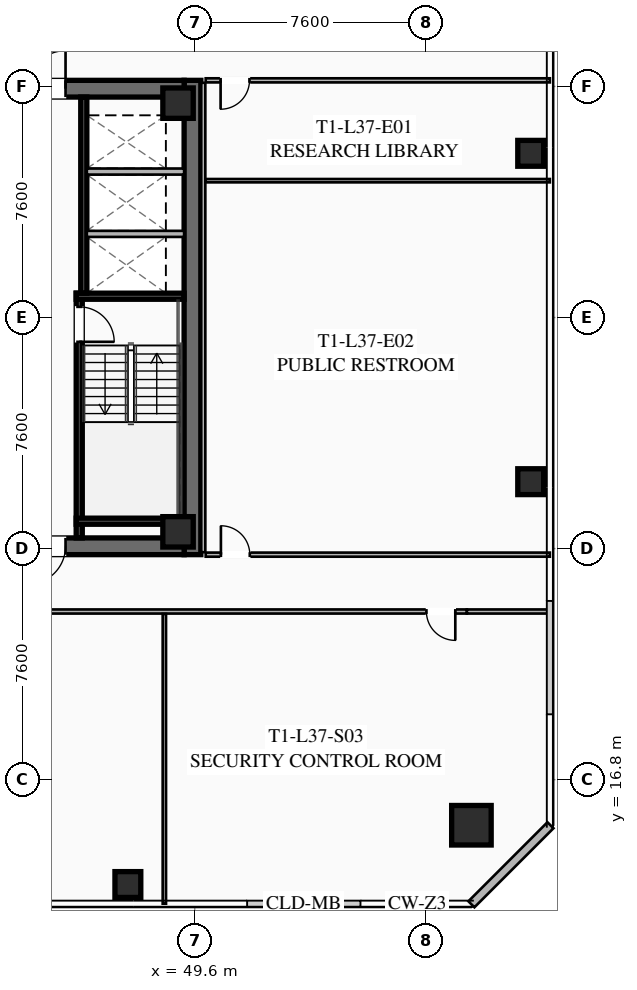
"""IFC4 building model, lengths in metres.
Left out: names, types, materials, properties, quantities, classifications, styles, units other than length and angle.
Written with IfcOpenShell. Run it as: python <this file> out.ifc"""

import sys

from ifc_helpers import new_model, si_unit, direction, frame, frame_2d, origin, origin_2d, place, context, subcontext, project, spatial, rectangle, hollow_rectangle, extrude, element, fill, save


model = new_model("IFC4")
c1 = context("Model", 3, precision=1e-05, world=origin(), true_north=direction((0.0, 1.0)))
c2 = subcontext(c1, "Body", "Model", "MODEL_VIEW")
j1 = project(units=[si_unit("LENGTHUNIT", "METRE"), si_unit("PLANEANGLEUNIT", "RADIAN")], contexts=[c1])
p1 = place(None, origin())
s1 = spatial("IfcSite", under=j1, at=p1, CompositionType="ELEMENT")
p2 = place(p1, origin())
s2 = spatial("IfcBuilding", under=s1, at=p2, CompositionType="ELEMENT")
p3 = place(p2, frame((0.0, 0.0, 139.25)))
s3 = spatial("IfcBuildingStorey", under=s2, at=p3, CompositionType="ELEMENT", Elevation=139.25)
p4 = place(p3, frame((49.525, 39.8, 0.0), z_axis=(0.0, 0.0, 1.0), x_axis=(0.0, -1.0, 0.0)))
e1 = element("IfcWall", 1, at=p4, inside=s3, PredefinedType="SHEAR", context=c2, shape_type="SweptSolid", body=[
    extrude(rectangle(XDim=15.6, YDim=0.55, at=frame_2d((7.8, 0.0))), origin(), (0.0, 0.0, 1.0), 3.55),
])
p5 = place(p3, frame((49.25, 24.475, 0.0), z_axis=(0.0, 0.0, 1.0), x_axis=(-1.0, 0.0, 0.0)))
e2 = element("IfcWall", 2, at=p5, inside=s3, PredefinedType="SHEAR", context=c2, shape_type="SweptSolid", body=[
    extrude(rectangle(XDim=14.5, YDim=0.55, at=frame_2d((7.25, 0.0))), origin(), (0.0, 0.0, 1.0), 3.55),
])
p6 = place(p5, frame((8.95, 0.0, 0.0)))
e3 = element("IfcOpeningElement", 3, at=p6, cuts=e2, PredefinedType="OPENING", context=c2, shape_type="SweptSolid", body=[
    extrude(rectangle(XDim=1.25, YDim=2.25, at=frame_2d((0.625, 1.125))), frame((0.0, 0.285, 0.0), z_axis=(0.0, -1.0, 0.0), x_axis=(1.0, 0.0, 0.0)), (0.0, 0.0, 1.0), 0.57),
])
p7 = place(p5, frame((3.9, 0.0, 0.0)))
e4 = element("IfcOpeningElement", 4, at=p7, cuts=e2, PredefinedType="OPENING", context=c2, shape_type="SweptSolid", body=[
    extrude(rectangle(XDim=1.25, YDim=2.25, at=frame_2d((0.625, 1.125))), frame((0.0, 0.285, 0.0), z_axis=(0.0, -1.0, 0.0), x_axis=(1.0, 0.0, 0.0)), (0.0, 0.0, 1.0), 0.57),
])
p8 = place(p3, frame((34.75, 39.525, 0.0), z_axis=(0.0, 0.0, 1.0), x_axis=(1.0, 0.0, 0.0)))
e5 = element("IfcWall", 5, at=p8, inside=s3, PredefinedType="SHEAR", context=c2, shape_type="SweptSolid", body=[
    extrude(rectangle(XDim=14.5, YDim=0.55, at=frame_2d((7.25, 0.0))), origin(), (0.0, 0.0, 1.0), 3.55),
])
p9 = place(p8, frame((4.3, 0.0, 0.0)))
e6 = element("IfcOpeningElement", 6, at=p9, cuts=e5, PredefinedType="OPENING", context=c2, shape_type="SweptSolid", body=[
    extrude(rectangle(XDim=1.25, YDim=2.25, at=frame_2d((0.625, 1.125))), frame((0.0, 0.285, 0.0), z_axis=(0.0, -1.0, 0.0), x_axis=(1.0, 0.0, 0.0)), (0.0, 0.0, 1.0), 0.57),
])
p10 = place(p8, frame((9.35, 0.0, 0.0)))
e7 = element("IfcOpeningElement", 7, at=p10, cuts=e5, PredefinedType="OPENING", context=c2, shape_type="SweptSolid", body=[
    extrude(rectangle(XDim=1.25, YDim=2.25, at=frame_2d((0.625, 1.125))), frame((0.0, 0.285, 0.0), z_axis=(0.0, -1.0, 0.0), x_axis=(1.0, 0.0, 0.0)), (0.0, 0.0, 1.0), 0.57),
])
for number, where, z_axis, x_axis in (
    (8, (49.05, 24.95, 0.0), (0.0, 0.0, 1.0), (1.0, 0.0, 0.0)),
    (9, (49.05, 39.05, 0.0), (0.0, 0.0, 1.0), (1.0, 0.0, 0.0)),
):
    element("IfcColumn", number, at=place(p3, frame(where, z_axis=z_axis, x_axis=x_axis)), inside=s3, PredefinedType="COLUMN", context=c2, shape_type="SweptSolid", body=[
        extrude(hollow_rectangle(XDim=1.0, YDim=1.0, WallThickness=0.04, at=origin_2d()), origin(), (0.0, 0.0, 1.0), 3.37),
    ])
p11 = place(p3, frame((58.7, 15.3, 0.0), z_axis=(0.0, 0.0, 1.0), x_axis=(1.0, 0.0, 0.0)))
e10 = element("IfcColumn", 10, at=p11, inside=s3, PredefinedType="COLUMN", context=c2, shape_type="SweptSolid", body=[
    extrude(hollow_rectangle(XDim=1.3, YDim=1.3, WallThickness=0.05, at=origin_2d()), origin(), (0.0, 0.0, 1.0), 3.37),
])
for number, where, z_axis, x_axis in (
    (11, (47.4, 13.35, 0.0), (0.0, 0.0, 1.0), (1.0, 0.0, 0.0)),
    (12, (60.65, 26.6, 0.0), (0.0, 0.0, 1.0), (1.0, 0.0, 0.0)),
    (13, (60.65, 37.4, 0.0), (0.0, 0.0, 1.0), (1.0, 0.0, 0.0)),
):
    element("IfcColumn", number, at=place(p3, frame(where, z_axis=z_axis, x_axis=x_axis)), inside=s3, PredefinedType="COLUMN", context=c2, shape_type="SweptSolid", body=[
        extrude(hollow_rectangle(XDim=0.85, YDim=0.85, WallThickness=0.035, at=origin_2d()), origin(), (0.0, 0.0, 1.0), 3.37),
    ])
p12 = place(p3, frame((61.3, 15.3, 0.0), z_axis=(0.0, 0.0, 1.0), x_axis=(-0.707106781187, -0.707106781187, 0.0)))
e14 = element("IfcWall", 14, at=p12, inside=s3, PredefinedType="SOLIDWALL", context=c2, shape_type="SweptSolid", body=[
    extrude(rectangle(XDim=3.677, YDim=0.28, at=frame_2d((1.838, 0.0))), origin(), (0.0, 0.0, 1.0), 3.37),
])
p13 = place(p3, frame((45.8, 32.8, 0.0), z_axis=(0.0, 0.0, 1.0), x_axis=(0.0, -1.0, 0.0)))
e15 = element("IfcWall", 15, at=p13, inside=s3, PredefinedType="SHEAR", context=c2, shape_type="SweptSolid", body=[
    extrude(rectangle(XDim=8.05, YDim=0.2, at=frame_2d((4.025, 0.0))), origin(), (0.0, 0.0, 1.0), 3.37),
])
p14 = place(p13, frame((0.45, 0.0, 0.0)))
e16 = element("IfcOpeningElement", 16, at=p14, cuts=e15, PredefinedType="OPENING", context=c2, shape_type="SweptSolid", body=[
    extrude(rectangle(XDim=1.15, YDim=2.2, at=frame_2d((0.575, 1.1))), frame((0.0, 0.11, 0.0), z_axis=(0.0, -1.0, 0.0), x_axis=(1.0, 0.0, 0.0)), (0.0, 0.0, 1.0), 0.22),
])
for number, where, z_axis, x_axis in (
    (17, (45.7, 32.7, 0.0), (0.0, 0.0, 1.0), (1.0, 0.0, 0.0)),
    (18, (45.7, 25.3, 0.0), (0.0, 0.0, 1.0), (1.0, 0.0, 0.0)),
):
    element("IfcWall", number, at=place(p3, frame(where, z_axis=z_axis, x_axis=x_axis)), inside=s3, PredefinedType="SHEAR", context=c2, shape_type="SweptSolid", body=[
        extrude(rectangle(XDim=3.55, YDim=0.2, at=frame_2d((1.775, 0.0))), origin(), (0.0, 0.0, 1.0), 3.37),
    ])
p15 = place(p3, frame((45.95, 39.25, 0.0), z_axis=(0.0, 0.0, 1.0), x_axis=(0.0, -1.0, 0.0)))
e19 = element("IfcWall", 19, at=p15, inside=s3, PredefinedType="SHEAR", context=c2, shape_type="SweptSolid", body=[
    extrude(rectangle(XDim=6.45, YDim=0.2, at=frame_2d((3.225, 0.0))), origin(), (0.0, 0.0, 1.0), 3.37),
])
for number, where, z_axis, x_axis in (
    (20, (46.05, 34.75, 0.0), (0.0, 0.0, 1.0), (1.0, 0.0, 0.0)),
    (21, (46.05, 36.8, 0.0), (0.0, 0.0, 1.0), (1.0, 0.0, 0.0)),
):
    element("IfcWall", number, at=place(p3, frame(where, z_axis=z_axis, x_axis=x_axis)), inside=s3, PredefinedType="SOLIDWALL", context=c2, shape_type="SweptSolid", body=[
        extrude(rectangle(XDim=3.2, YDim=0.2, at=frame_2d((1.6, 0.0))), origin(), (0.0, 0.0, 1.0), 3.37),
    ])
p16 = place(p3, frame((58.55, 22.33, 0.0), z_axis=(0.0, 0.0, 1.0), x_axis=(-1.0, 0.0, 0.0)))
e22 = element("IfcWall", 22, at=p16, inside=s3, PredefinedType="PARTITIONING", context=c2, shape_type="SweptSolid", body=[
    extrude(rectangle(XDim=33.1, YDim=0.135, at=frame_2d((16.55, 0.0))), origin(), (0.0, 0.0, 1.0), 2.723),
])
p17 = place(p16, frame((31.77, 0.0, 0.0)))
e23 = element("IfcOpeningElement", 23, at=p17, cuts=e22, PredefinedType="OPENING", context=c2, shape_type="SweptSolid", body=[
    extrude(rectangle(XDim=0.95, YDim=2.05, at=frame_2d((0.475, 1.025))), frame((0.0, 0.077, 0.0), z_axis=(0.0, -1.0, 0.0), x_axis=(1.0, 0.0, 0.0)), (0.0, 0.0, 1.0), 0.155),
])
p18 = place(p16, frame((15.868, 0.0, 0.0)))
e24 = element("IfcOpeningElement", 24, at=p18, cuts=e22, PredefinedType="OPENING", context=c2, shape_type="SweptSolid", body=[
    extrude(rectangle(XDim=0.95, YDim=2.05, at=frame_2d((0.475, 1.025))), frame((0.0, 0.077, 0.0), z_axis=(0.0, -1.0, 0.0), x_axis=(1.0, 0.0, 0.0)), (0.0, 0.0, 1.0), 0.155),
])
p19 = place(p16, frame((0.38, 0.0, 0.0)))
e25 = element("IfcOpeningElement", 25, at=p19, cuts=e22, PredefinedType="OPENING", context=c2, shape_type="SweptSolid", body=[
    extrude(rectangle(XDim=0.95, YDim=2.05, at=frame_2d((0.475, 1.025))), frame((0.0, 0.077, 0.0), z_axis=(0.0, -1.0, 0.0), x_axis=(1.0, 0.0, 0.0)), (0.0, 0.0, 1.0), 0.155),
])
p20 = place(p3, frame((58.55, 22.33, 0.0), z_axis=(0.0, 0.0, 1.0), x_axis=(1.0, 0.0, 0.0)))
e26 = element("IfcWall", 26, at=p20, inside=s3, PredefinedType="PARTITIONING", context=c2, shape_type="SweptSolid", body=[
    extrude(rectangle(XDim=2.73, YDim=0.135, at=frame_2d((1.365, 0.0))), origin(), (0.0, 0.0, 1.0), 2.723),
])
p21 = place(p3, frame((48.6, 12.72, 0.0), z_axis=(0.0, 0.0, 1.0), x_axis=(0.0, 1.0, 0.0)))
e27 = element("IfcWall", 27, at=p21, inside=s3, PredefinedType="PARTITIONING", context=c2, shape_type="SweptSolid", body=[
    extrude(rectangle(XDim=9.53, YDim=0.11, at=frame_2d((4.765, 0.0))), origin(), (0.0, 0.0, 1.0), 2.723),
])
p22 = place(p3, frame((49.88, 39.72, 0.0), z_axis=(0.0, 0.0, 1.0), x_axis=(0.0, -1.0, 0.0)))
e28 = element("IfcWall", 28, at=p22, inside=s3, PredefinedType="PARTITIONING", context=c2, shape_type="SweptSolid", body=[
    extrude(rectangle(XDim=15.44, YDim=0.135, at=frame_2d((7.72, 0.0))), origin(), (0.0, 0.0, 1.0), 2.723),
])
p23 = place(p3, frame((61.28, 39.8, 0.0), z_axis=(0.0, 0.0, 1.0), x_axis=(-1.0, 0.0, 0.0)))
e29 = element("IfcWall", 29, at=p23, inside=s3, PredefinedType="PARTITIONING", context=c2, shape_type="SweptSolid", body=[
    extrude(rectangle(XDim=11.32, YDim=0.135, at=frame_2d((5.66, 0.0))), origin(), (0.0, 0.0, 1.0), 2.723),
])
p24 = place(p23, frame((9.88, 0.0, 0.0)))
e30 = element("IfcOpeningElement", 30, at=p24, cuts=e29, PredefinedType="OPENING", context=c2, shape_type="SweptSolid", body=[
    extrude(rectangle(XDim=0.95, YDim=2.05, at=frame_2d((0.475, 1.025))), frame((0.0, 0.077, 0.0), z_axis=(0.0, -1.0, 0.0), x_axis=(1.0, 0.0, 0.0)), (0.0, 0.0, 1.0), 0.155),
])
p25 = place(p3, frame((49.96, 24.2, 0.0), z_axis=(0.0, 0.0, 1.0), x_axis=(1.0, 0.0, 0.0)))
e31 = element("IfcWall", 31, at=p25, inside=s3, PredefinedType="PARTITIONING", context=c2, shape_type="SweptSolid", body=[
    extrude(rectangle(XDim=11.32, YDim=0.135, at=frame_2d((5.66, 0.0))), origin(), (0.0, 0.0, 1.0), 2.723),
])
p26 = place(p25, frame((0.5, 0.0, 0.0)))
e32 = element("IfcOpeningElement", 32, at=p26, cuts=e31, PredefinedType="OPENING", context=c2, shape_type="SweptSolid", body=[
    extrude(rectangle(XDim=0.95, YDim=2.05, at=frame_2d((0.475, 1.025))), frame((0.0, 0.077, 0.0), z_axis=(0.0, -1.0, 0.0), x_axis=(1.0, 0.0, 0.0)), (0.0, 0.0, 1.0), 0.155),
])
p27 = place(p3, frame((49.96, 36.5, 0.0), z_axis=(0.0, 0.0, 1.0), x_axis=(1.0, 0.0, 0.0)))
e33 = element("IfcWall", 33, at=p27, inside=s3, PredefinedType="PARTITIONING", context=c2, shape_type="SweptSolid", body=[
    extrude(rectangle(XDim=11.32, YDim=0.11, at=frame_2d((5.66, 0.0))), origin(), (0.0, 0.0, 1.0), 2.723),
])
p28 = place(p10, origin())
e34 = element("IfcDoor", 34, at=p28, inside=s3, OperationType="SINGLE_SWING_RIGHT", PredefinedType="DOOR", context=c2, shape_type="SweptSolid", body=[
    extrude(rectangle(XDim=1.25, YDim=2.25, at=frame_2d((0.625, 1.125))), frame((0.0, 0.025, 0.0), z_axis=(0.0, -1.0, 0.0), x_axis=(1.0, 0.0, 0.0)), (0.0, 0.0, 1.0), 0.05),
])
fill(e7, e34)
p29 = place(p7, origin())
e35 = element("IfcDoor", 35, at=p29, inside=s3, OperationType="SINGLE_SWING_RIGHT", PredefinedType="DOOR", context=c2, shape_type="SweptSolid", body=[
    extrude(rectangle(XDim=1.25, YDim=2.25, at=frame_2d((0.625, 1.125))), frame((0.0, 0.025, 0.0), z_axis=(0.0, -1.0, 0.0), x_axis=(1.0, 0.0, 0.0)), (0.0, 0.0, 1.0), 0.05),
])
fill(e4, e35)
p30 = place(p14, origin())
e36 = element("IfcDoor", 36, at=p30, inside=s3, OperationType="SINGLE_SWING_RIGHT", PredefinedType="DOOR", context=c2, shape_type="SweptSolid", body=[
    extrude(rectangle(XDim=1.15, YDim=2.2, at=frame_2d((0.575, 1.1))), frame((0.0, 0.025, 0.0), z_axis=(0.0, -1.0, 0.0), x_axis=(1.0, 0.0, 0.0)), (0.0, 0.0, 1.0), 0.05),
])
fill(e16, e36)
p31 = place(p19, origin())
e37 = element("IfcDoor", 37, at=p31, inside=s3, OperationType="SINGLE_SWING_LEFT", PredefinedType="DOOR", context=c2, shape_type="SweptSolid", body=[
    extrude(rectangle(XDim=0.95, YDim=2.05, at=frame_2d((0.475, 1.025))), frame((0.0, 0.025, 0.0), z_axis=(0.0, -1.0, 0.0), x_axis=(1.0, 0.0, 0.0)), (0.0, 0.0, 1.0), 0.05),
])
fill(e25, e37)
p32 = place(p24, origin())
e38 = element("IfcDoor", 38, at=p32, inside=s3, OperationType="SINGLE_SWING_RIGHT", PredefinedType="DOOR", context=c2, shape_type="SweptSolid", body=[
    extrude(rectangle(XDim=0.95, YDim=2.05, at=frame_2d((0.475, 1.025))), frame((0.0, 0.025, 0.0), z_axis=(0.0, -1.0, 0.0), x_axis=(1.0, 0.0, 0.0)), (0.0, 0.0, 1.0), 0.05),
])
fill(e30, e38)
p33 = place(p26, origin())
e39 = element("IfcDoor", 39, at=p33, inside=s3, OperationType="SINGLE_SWING_LEFT", PredefinedType="DOOR", context=c2, shape_type="SweptSolid", body=[
    extrude(rectangle(XDim=0.95, YDim=2.05, at=frame_2d((0.475, 1.025))), frame((0.0, 0.025, 0.0), z_axis=(0.0, -1.0, 0.0), x_axis=(1.0, 0.0, 0.0)), (0.0, 0.0, 1.0), 0.05),
])
fill(e32, e39)
save(model, sys.argv[1])
